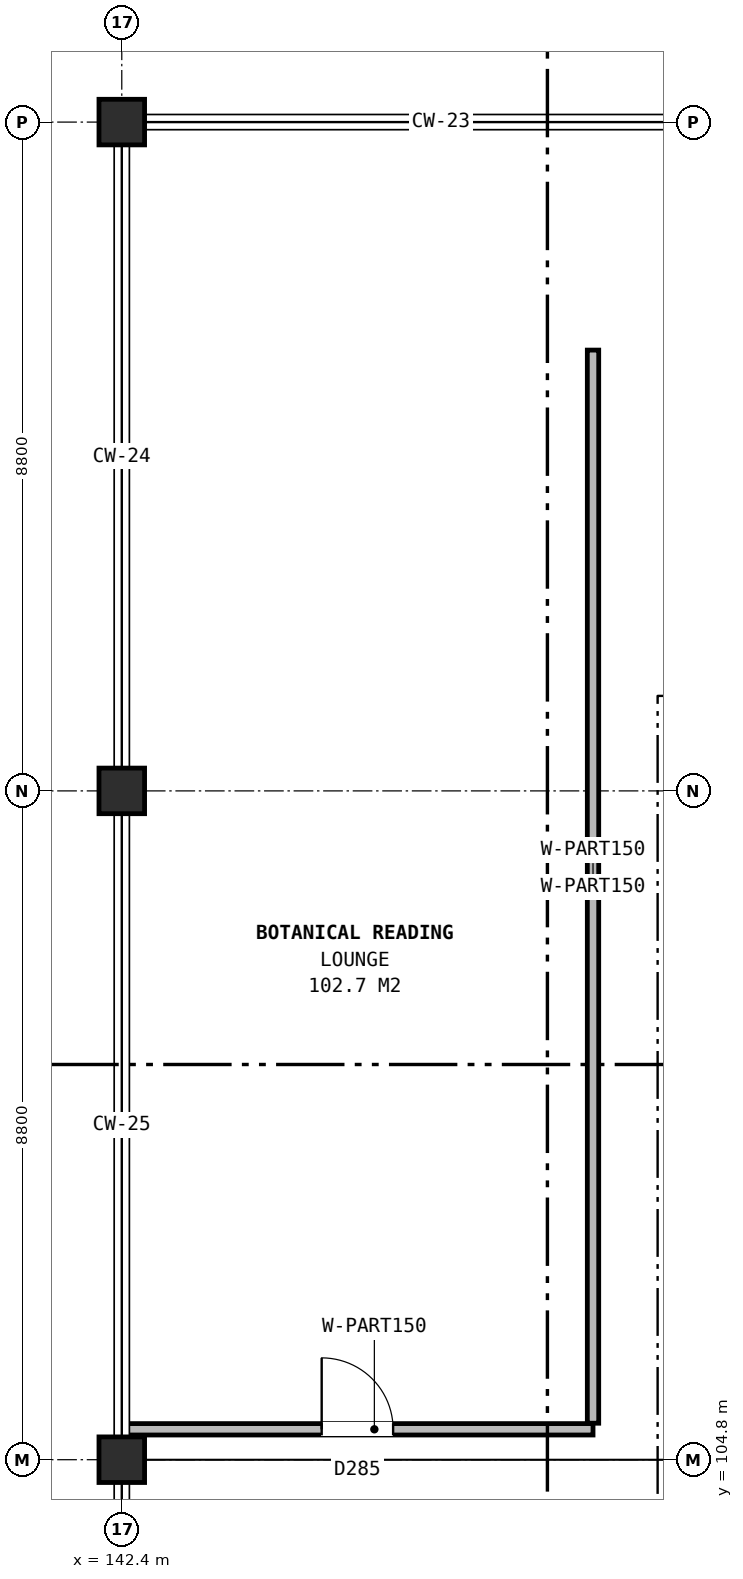
"""IFC4 building model, lengths in metres.
Left out: names, types, materials, properties, quantities, classifications, styles, units other than length and angle.
Written with IfcOpenShell. Run it as: python <this file> out.ifc"""

import sys

from ifc_helpers import new_model, si_unit, direction, frame, frame_2d, origin, origin_2d, place, context, subcontext, project, spatial, rectangle, extrude, element, fill, save


model = new_model("IFC4")
c1 = context("Model", 3, precision=1e-05, world=origin(), true_north=direction((0.0, 1.0)))
c2 = subcontext(c1, "Body", "Model", "MODEL_VIEW")
j1 = project(units=[si_unit("LENGTHUNIT", "METRE"), si_unit("PLANEANGLEUNIT", "RADIAN")], contexts=[c1])
p1 = place(None, origin())
s1 = spatial("IfcSite", under=j1, at=p1, CompositionType="ELEMENT")
p2 = place(p1, origin())
s2 = spatial("IfcBuilding", under=s1, at=p2, CompositionType="ELEMENT")
p3 = place(p2, frame((0.0, 0.0, 63.8)))
s3 = spatial("IfcBuildingStorey", under=s2, at=p3, CompositionType="ELEMENT", Elevation=63.8)
for number, where, z_axis, x_axis in (
    (1, (142.4, 104.8, 0.0), (0.0, 0.0, 1.0), (1.0, 0.0, 0.0)),
    (2, (142.4, 113.6, 0.0), (0.0, 0.0, 1.0), (1.0, 0.0, 0.0)),
    (3, (142.4, 122.4, 0.0), (0.0, 0.0, 1.0), (1.0, 0.0, 0.0)),
):
    element("IfcColumn", number, at=place(p3, frame(where, z_axis=z_axis, x_axis=x_axis)), inside=s3, PredefinedType="COLUMN", context=c2, shape_type="SweptSolid", body=[
        extrude(rectangle(XDim=0.6, YDim=0.6, at=origin_2d()), origin(), (0.0, 0.0, 1.0), 4.2),
    ])
p4 = place(p3, frame((142.4, 105.2, 0.0), z_axis=(0.0, 0.0, 1.0), x_axis=(1.0, 0.0, 0.0)))
e4 = element("IfcWall", 4, at=p4, inside=s3, PredefinedType="PARTITIONING", context=c2, shape_type="SweptSolid", body=[
    extrude(rectangle(XDim=6.2, YDim=0.15, at=frame_2d((3.1, 0.0))), origin(), (0.0, 0.0, 1.0), 3.445),
])
p5 = place(p4, frame((2.63, 0.0, 0.0)))
e5 = element("IfcOpeningElement", 5, at=p5, cuts=e4, PredefinedType="OPENING", context=c2, shape_type="SweptSolid", body=[
    extrude(rectangle(XDim=0.94, YDim=2.12, at=frame_2d((0.47, 1.06))), frame((0.0, 0.085, 0.0), z_axis=(0.0, -1.0, 0.0), x_axis=(1.0, 0.0, 0.0)), (0.0, 0.0, 1.0), 0.17),
])
p6 = place(p3, frame((148.6, 105.28, 0.0), z_axis=(0.0, 0.0, 1.0), x_axis=(0.0, 1.0, 0.0)))
e6 = element("IfcWall", 6, at=p6, inside=s3, PredefinedType="PARTITIONING", context=c2, shape_type="SweptSolid", body=[
    extrude(rectangle(XDim=14.12, YDim=0.15, at=frame_2d((7.06, 0.0))), origin(), (0.0, 0.0, 1.0), 3.865),
])
p7 = place(p5, origin())
e7 = element("IfcDoor", 7, at=p7, inside=s3, OperationType="SINGLE_SWING_LEFT", PredefinedType="DOOR", context=c2, shape_type="SweptSolid", body=[
    extrude(rectangle(XDim=0.94, YDim=2.12, at=frame_2d((0.47, 1.06))), frame((0.0, 0.025, 0.0), z_axis=(0.0, -1.0, 0.0), x_axis=(1.0, 0.0, 0.0)), (0.0, 0.0, 1.0), 0.05),
])
fill(e5, e7)
save(model, sys.argv[1])
